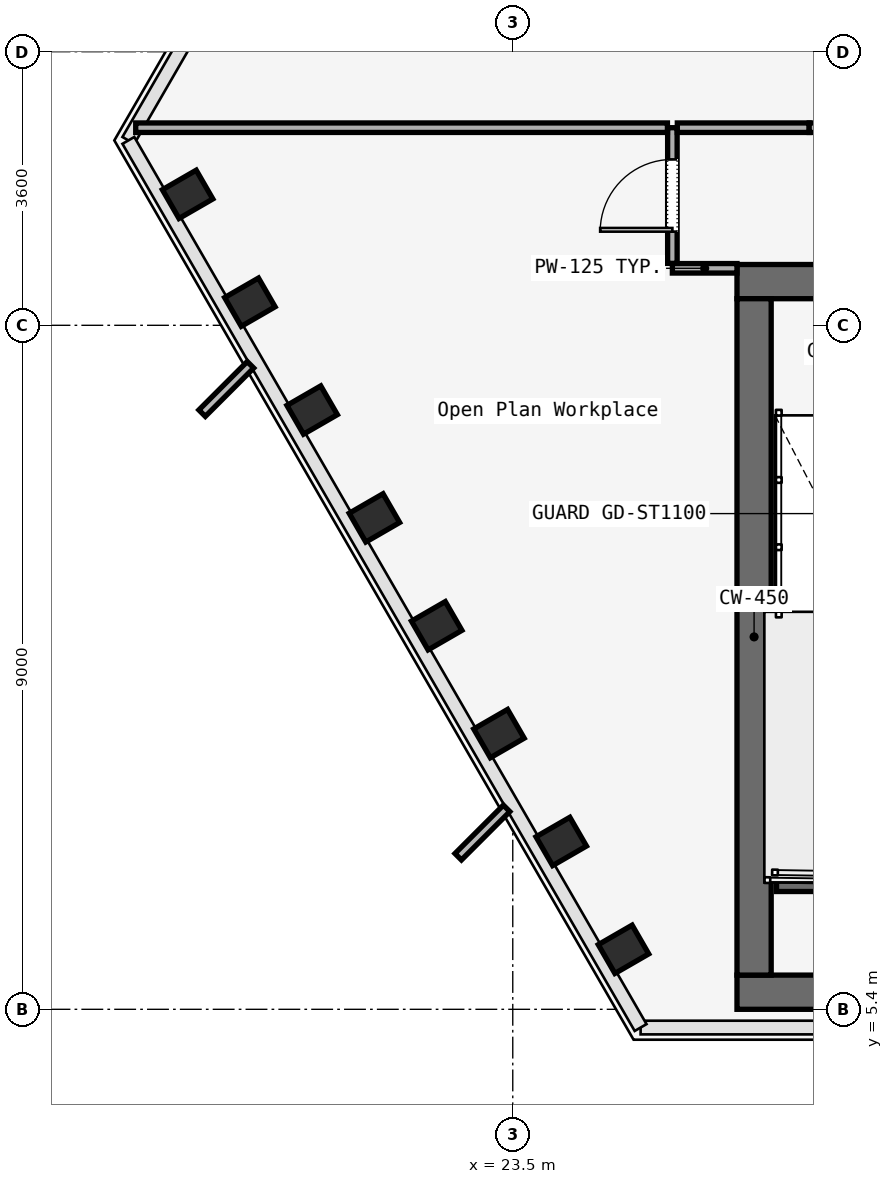
"""IFC4 building model, lengths in metres.
Left out: names, types, materials, properties, quantities, classifications, styles, units other than length and angle.
Written with IfcOpenShell. Run it as: python <this file> out.ifc"""

import sys

from ifc_helpers import new_model, si_unit, direction, frame, frame_2d, origin, origin_2d, place, context, subcontext, project, spatial, rectangle, i_section, extrude, element, fill, save


model = new_model("IFC4")
c1 = context("Model", 3, precision=1e-05, world=origin(), true_north=direction((0.0, 1.0)))
c2 = subcontext(c1, "Body", "Model", "MODEL_VIEW")
j1 = project(units=[si_unit("LENGTHUNIT", "METRE"), si_unit("PLANEANGLEUNIT", "RADIAN")], contexts=[c1])
p1 = place(None, origin())
s1 = spatial("IfcSite", under=j1, at=p1, CompositionType="ELEMENT")
p2 = place(p1, origin())
s2 = spatial("IfcBuilding", under=s1, at=p2, CompositionType="ELEMENT")
p3 = place(p2, frame((0.0, 0.0, 104.4)))
s3 = spatial("IfcBuildingStorey", under=s2, at=p3, CompositionType="ELEMENT", Elevation=104.4)
p4 = place(p3, frame((26.45, 14.975, 0.0), z_axis=(0.0, 0.0, 1.0), x_axis=(1.0, 0.0, 0.0)))
e1 = element("IfcWall", 1, at=p4, inside=s3, PredefinedType="SOLIDWALL", context=c2, shape_type="SweptSolid", body=[
    extrude(rectangle(XDim=31.1, YDim=0.45, at=frame_2d((15.55, 0.0))), origin(), (0.0, 0.0, 1.0), 3.58),
])
p5 = place(p4, frame((1.65, 0.0, 0.0)))
e2 = element("IfcOpeningElement", 2, at=p5, cuts=e1, PredefinedType="OPENING", context=c2, shape_type="SweptSolid", body=[
    extrude(rectangle(XDim=1.1, YDim=2.2, at=frame_2d((0.55, 1.1))), frame((0.0, 0.225, 0.0), z_axis=(0.0, -1.0, 0.0), x_axis=(1.0, 0.0, 0.0)), (0.0, 0.0, 1.0), 0.45),
])
p6 = place(p4, frame((13.65, 0.0, 0.0)))
e3 = element("IfcOpeningElement", 3, at=p6, cuts=e1, PredefinedType="OPENING", context=c2, shape_type="SweptSolid", body=[
    extrude(rectangle(XDim=1.1, YDim=2.2, at=frame_2d((0.55, 1.1))), frame((0.0, 0.225, 0.0), z_axis=(0.0, -1.0, 0.0), x_axis=(1.0, 0.0, 0.0)), (0.0, 0.0, 1.0), 0.45),
])
p7 = place(p4, frame((25.55, 0.0, 0.0)))
e4 = element("IfcOpeningElement", 4, at=p7, cuts=e1, PredefinedType="OPENING", context=c2, shape_type="SweptSolid", body=[
    extrude(rectangle(XDim=1.1, YDim=2.2, at=frame_2d((0.55, 1.1))), frame((0.0, 0.225, 0.0), z_axis=(0.0, -1.0, 0.0), x_axis=(1.0, 0.0, 0.0)), (0.0, 0.0, 1.0), 0.45),
])
p8 = place(p4, frame((10.7, 0.0, 0.0)))
e5 = element("IfcOpeningElement", 5, at=p8, cuts=e1, PredefinedType="OPENING", context=c2, shape_type="SweptSolid", body=[
    extrude(rectangle(XDim=1.4, YDim=2.2, at=frame_2d((0.7, 1.1))), frame((0.0, 0.225, 0.0), z_axis=(0.0, -1.0, 0.0), x_axis=(1.0, 0.0, 0.0)), (0.0, 0.0, 1.0), 0.45),
])
p9 = place(p4, frame((19.35, 0.0, 0.0)))
e6 = element("IfcOpeningElement", 6, at=p9, cuts=e1, PredefinedType="OPENING", context=c2, shape_type="SweptSolid", body=[
    extrude(rectangle(XDim=1.1, YDim=2.2, at=frame_2d((0.55, 1.1))), frame((0.0, 0.225, 0.0), z_axis=(0.0, -1.0, 0.0), x_axis=(1.0, 0.0, 0.0)), (0.0, 0.0, 1.0), 0.45),
])
p10 = place(p4, frame((21.4, 0.0, 0.0)))
e7 = element("IfcOpeningElement", 7, at=p10, cuts=e1, PredefinedType="OPENING", context=c2, shape_type="SweptSolid", body=[
    extrude(rectangle(XDim=0.9, YDim=2.1, at=frame_2d((0.45, 1.05))), frame((0.0, 0.225, 0.0), z_axis=(0.0, -1.0, 0.0), x_axis=(1.0, 0.0, 0.0)), (0.0, 0.0, 1.0), 0.45),
])
p11 = place(p4, frame((23.35, 0.0, 0.0)))
e8 = element("IfcOpeningElement", 8, at=p11, cuts=e1, PredefinedType="OPENING", context=c2, shape_type="SweptSolid", body=[
    extrude(rectangle(XDim=1.3, YDim=2.3, at=frame_2d((0.65, 1.15))), frame((0.0, 0.225, 0.0), z_axis=(0.0, -1.0, 0.0), x_axis=(1.0, 0.0, 0.0)), (0.0, 0.0, 1.0), 0.45),
])
p12 = place(p3, frame((26.45, 5.625, 0.0), z_axis=(0.0, 0.0, 1.0), x_axis=(1.0, 0.0, 0.0)))
e9 = element("IfcWall", 9, at=p12, inside=s3, PredefinedType="SOLIDWALL", context=c2, shape_type="SweptSolid", body=[
    extrude(rectangle(XDim=31.1, YDim=0.45, at=frame_2d((15.55, 0.0))), origin(), (0.0, 0.0, 1.0), 3.58),
])
p13 = place(p3, frame((26.675, 5.85, 0.0), z_axis=(0.0, 0.0, 1.0), x_axis=(0.0, 1.0, 0.0)))
e10 = element("IfcWall", 10, at=p13, inside=s3, PredefinedType="SOLIDWALL", context=c2, shape_type="SweptSolid", body=[
    extrude(rectangle(XDim=8.9, YDim=0.45, at=frame_2d((4.45, 0.0))), origin(), (0.0, 0.0, 1.0), 3.58),
])
for number, where, z_axis, x_axis in (
    (11, (19.222, 16.123, 0.0), (0.0, 0.0, 1.0), (-0.5, 0.866, 0.0)),
    (12, (20.041, 14.704, 0.0), (0.0, 0.0, 1.0), (-0.5, 0.866, 0.0)),
    (13, (20.861, 13.285, 0.0), (0.0, 0.0, 1.0), (-0.5, 0.866, 0.0)),
    (14, (21.68, 11.866, 0.0), (0.0, 0.0, 1.0), (-0.5, 0.866, 0.0)),
    (15, (22.499, 10.447, 0.0), (0.0, 0.0, 1.0), (-0.5, 0.866, 0.0)),
    (16, (23.318, 9.028, 0.0), (0.0, 0.0, 1.0), (-0.5, 0.866, 0.0)),
    (17, (24.138, 7.609, 0.0), (0.0, 0.0, 1.0), (-0.5, 0.866, 0.0)),
    (18, (24.957, 6.19, 0.0), (0.0, 0.0, 1.0), (-0.5, 0.866, 0.0)),
):
    element("IfcColumn", number, at=place(p3, frame(where, z_axis=z_axis, x_axis=x_axis)), inside=s3, PredefinedType="COLUMN", context=c2, shape_type="SweptSolid", body=[
        extrude(i_section(OverallWidth=0.437, OverallDepth=0.514, WebThickness=0.061, FlangeThickness=0.077, FilletRadius=0.015, at=origin_2d()), origin(), (0.0, 0.0, 1.0), 3.58),
    ])
p14 = place(p3, frame((26.97, 7.05, 0.0), z_axis=(0.0, 0.0, 1.0), x_axis=(1.0, 0.0, 0.0)))
e19 = element("IfcWall", 19, at=p14, inside=s3, PredefinedType="SOLIDWALL", context=c2, shape_type="SweptSolid", body=[
    extrude(rectangle(XDim=3.115, YDim=0.2, at=frame_2d((1.558, 0.0))), origin(), (0.0, 0.0, 1.0), 3.8),
])
p15 = place(p3, frame((26.45, 15.15, 0.0), z_axis=(0.0, 0.0, 1.0), x_axis=(-1.0, 0.0, 0.0)))
e20 = element("IfcWall", 20, at=p15, inside=s3, PredefinedType="PARTITIONING", context=c2, shape_type="SweptSolid", body=[
    extrude(rectangle(XDim=0.85, YDim=0.125, at=frame_2d((0.425, 0.0))), origin(), (0.0, 0.0, 1.0), 2.95),
])
p16 = place(p3, frame((25.6, 15.215, 0.0), z_axis=(0.0, 0.0, 1.0), x_axis=(0.0, 1.0, 0.0)))
e21 = element("IfcWall", 21, at=p16, inside=s3, PredefinedType="PARTITIONING", context=c2, shape_type="SweptSolid", body=[
    extrude(rectangle(XDim=1.785, YDim=0.125, at=frame_2d((0.893, 0.0))), origin(), (0.0, 0.0, 1.0), 2.95),
])
p17 = place(p16, frame((0.417, 0.0, 0.0)))
e22 = element("IfcOpeningElement", 22, at=p17, cuts=e21, PredefinedType="OPENING", context=c2, shape_type="SweptSolid", body=[
    extrude(rectangle(XDim=0.95, YDim=2.2, at=frame_2d((0.475, 1.1))), frame((0.0, 0.062, 0.0), z_axis=(0.0, -1.0, 0.0), x_axis=(1.0, 0.0, 0.0)), (0.0, 0.0, 1.0), 0.125),
])
p18 = place(p3, frame((25.665, 17.0, 0.0), z_axis=(0.0, 0.0, 1.0), x_axis=(1.0, 0.0, 0.0)))
e23 = element("IfcWall", 23, at=p18, inside=s3, PredefinedType="PARTITIONING", context=c2, shape_type="SweptSolid", body=[
    extrude(rectangle(XDim=1.735, YDim=0.125, at=frame_2d((0.867, 0.0))), origin(), (0.0, 0.0, 1.0), 2.95),
])
p19 = place(p3, frame((27.4, 17.0, 0.0), z_axis=(0.0, 0.0, 1.0), x_axis=(1.0, 0.0, 0.0)))
e24 = element("IfcWall", 24, at=p19, inside=s3, PredefinedType="PARTITIONING", context=c2, shape_type="SweptSolid", body=[
    extrude(rectangle(XDim=2.4, YDim=0.125, at=frame_2d((1.2, 0.0))), origin(), (0.0, 0.0, 1.0), 2.95),
])
p20 = place(p3, frame((18.539, 17.0, 0.0), z_axis=(0.0, 0.0, 1.0), x_axis=(1.0, 0.0, 0.0)))
e25 = element("IfcWall", 25, at=p20, inside=s3, PredefinedType="PARTITIONING", context=c2, shape_type="SweptSolid", body=[
    extrude(rectangle(XDim=6.996, YDim=0.125, at=frame_2d((3.498, 0.0))), origin(), (0.0, 0.0, 1.0), 2.95),
])
p21 = place(p17, origin())
e26 = element("IfcDoor", 26, at=p21, inside=s3, OperationType="SINGLE_SWING_LEFT", PredefinedType="DOOR", context=c2, shape_type="SweptSolid", body=[
    extrude(rectangle(XDim=0.95, YDim=2.2, at=frame_2d((0.475, 1.1))), frame((0.0, 0.025, 0.0), z_axis=(0.0, -1.0, 0.0), x_axis=(1.0, 0.0, 0.0)), (0.0, 0.0, 1.0), 0.05),
])
fill(e22, e26)
save(model, sys.argv[1])
